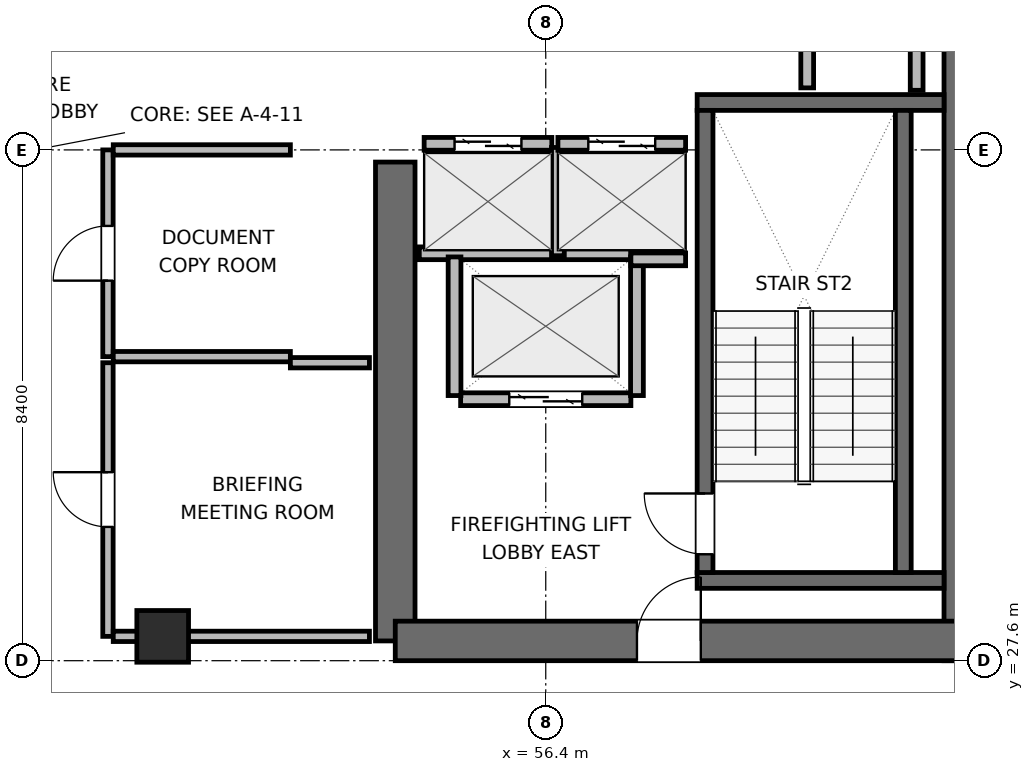
"""IFC4 building model, lengths in metres.
Left out: names, types, materials, properties, quantities, classifications, styles, units other than length and angle.
Written with IfcOpenShell. Run it as: python <this file> out.ifc"""

import sys

from ifc_helpers import new_model, si_unit, direction, frame, frame_2d, origin, origin_2d, place, context, subcontext, project, spatial, rectangle, extrude, element, fill, save


model = new_model("IFC4")
c1 = context("Model", 3, precision=1e-05, world=origin(), true_north=direction((0.0, 1.0)))
c2 = subcontext(c1, "Body", "Model", "MODEL_VIEW")
j1 = project(units=[si_unit("LENGTHUNIT", "METRE"), si_unit("PLANEANGLEUNIT", "RADIAN")], contexts=[c1])
p1 = place(None, origin())
s1 = spatial("IfcSite", under=j1, at=p1, CompositionType="ELEMENT")
p2 = place(p1, origin())
s2 = spatial("IfcBuilding", under=s1, at=p2, CompositionType="ELEMENT")
p3 = place(p2, frame((0.0, 0.0, 247.2)))
s3 = spatial("IfcBuildingStorey", under=s2, at=p3, CompositionType="ELEMENT", Elevation=247.2)
p4 = place(p3, frame((53.925, 27.925, 0.0), z_axis=(0.0, 0.0, 1.0), x_axis=(0.0, 1.0, 0.0)))
e1 = element("IfcWall", 1, at=p4, inside=s3, PredefinedType="SHEAR", context=c2, shape_type="SweptSolid", body=[
    extrude(rectangle(XDim=7.875, YDim=0.65, at=frame_2d((3.938, 0.0))), origin(), (0.0, 0.0, 1.0), 3.9),
])
p5 = place(p3, frame((63.275, 27.6, 0.0), z_axis=(0.0, 0.0, 1.0), x_axis=(0.0, 1.0, 0.0)))
e2 = element("IfcWall", 2, at=p5, inside=s3, PredefinedType="SHEAR", context=c2, shape_type="SweptSolid", body=[
    extrude(rectangle(XDim=16.8, YDim=0.65, at=frame_2d((8.4, 0.0))), origin(), (0.0, 0.0, 1.0), 3.9),
])
p6 = place(p3, frame((53.925, 27.925, 0.0), z_axis=(0.0, 0.0, 1.0), x_axis=(1.0, 0.0, 0.0)))
e3 = element("IfcWall", 3, at=p6, inside=s3, PredefinedType="SHEAR", context=c2, shape_type="SweptSolid", body=[
    extrude(rectangle(XDim=9.35, YDim=0.65, at=frame_2d((4.675, 0.0))), origin(), (0.0, 0.0, 1.0), 3.9),
])
p7 = place(p6, frame((3.975, 0.0, 0.0)))
e4 = element("IfcOpeningElement", 4, at=p7, cuts=e3, PredefinedType="OPENING", context=c2, shape_type="SweptSolid", body=[
    extrude(rectangle(XDim=1.05, YDim=2.04, at=frame_2d((0.525, 1.02))), frame((0.0, 0.335, 0.0), z_axis=(0.0, -1.0, 0.0), x_axis=(1.0, 0.0, 0.0)), (0.0, 0.0, 1.0), 0.67),
])
for number, where, z_axis, x_axis in (
    (5, (58.89, 28.92, 0.0), (0.0, 0.0, 1.0), (1.0, 0.0, 0.0)),
    (6, (58.89, 36.78, 0.0), (0.0, 0.0, 1.0), (1.0, 0.0, 0.0)),
):
    element("IfcWall", number, at=place(p3, frame(where, z_axis=z_axis, x_axis=x_axis)), inside=s3, PredefinedType="SHEAR", context=c2, shape_type="SweptSolid", body=[
        extrude(rectangle(XDim=4.06, YDim=0.26, at=frame_2d((2.03, 0.0))), origin(), (0.0, 0.0, 1.0), 3.9),
    ])
p8 = place(p3, frame((59.02, 29.05, 0.0), z_axis=(0.0, 0.0, 1.0), x_axis=(0.0, 1.0, 0.0)))
e7 = element("IfcWall", 7, at=p8, inside=s3, PredefinedType="SHEAR", context=c2, shape_type="SweptSolid", body=[
    extrude(rectangle(XDim=7.6, YDim=0.26, at=frame_2d((3.8, 0.0))), origin(), (0.0, 0.0, 1.0), 3.9),
])
p9 = place(p8, frame((0.3, 0.0, 0.0)))
e8 = element("IfcOpeningElement", 8, at=p9, cuts=e7, PredefinedType="OPENING", context=c2, shape_type="SweptSolid", body=[
    extrude(rectangle(XDim=1.0, YDim=2.04, at=frame_2d((0.5, 1.02))), frame((0.0, 0.14, 0.0), z_axis=(0.0, -1.0, 0.0), x_axis=(1.0, 0.0, 0.0)), (0.0, 0.0, 1.0), 0.28),
])
p10 = place(p3, frame((62.28, 29.05, 0.0), z_axis=(0.0, 0.0, 1.0), x_axis=(0.0, 1.0, 0.0)))
e9 = element("IfcWall", 9, at=p10, inside=s3, PredefinedType="SHEAR", context=c2, shape_type="SweptSolid", body=[
    extrude(rectangle(XDim=7.6, YDim=0.26, at=frame_2d((3.8, 0.0))), origin(), (0.0, 0.0, 1.0), 3.9),
])
p11 = place(p3, frame((50.1, 28.0, 0.0), z_axis=(0.0, 0.0, 1.0), x_axis=(1.0, 0.0, 0.0)))
e10 = element("IfcColumn", 10, at=p11, inside=s3, PredefinedType="COLUMN", context=c2, shape_type="SweptSolid", body=[
    extrude(rectangle(XDim=0.85, YDim=0.85, at=origin_2d()), origin(), (0.0, 0.0, 1.0), 3.9),
])
p12 = place(p3, frame((60.7, 37.02, 0.0), z_axis=(0.0, 0.0, 1.0), x_axis=(0.0, 1.0, 0.0)))
e11 = element("IfcWall", 11, at=p12, inside=s3, PredefinedType="PARTITIONING", context=c2, shape_type="SweptSolid", body=[
    extrude(rectangle(XDim=1.96, YDim=0.21, at=frame_2d((0.98, 0.0))), origin(), (0.0, 0.0, 1.0), 3.68),
])
p13 = place(p3, frame((62.5, 36.98, 0.0), z_axis=(0.0, 0.0, 1.0), x_axis=(0.0, 1.0, 0.0)))
e12 = element("IfcWall", 12, at=p13, inside=s3, PredefinedType="PARTITIONING", context=c2, shape_type="SweptSolid", body=[
    extrude(rectangle(XDim=2.04, YDim=0.21, at=frame_2d((1.02, 0.0))), origin(), (0.0, 0.0, 1.0), 3.68),
])
p14 = place(p3, frame((55.0, 31.9, 0.0), z_axis=(0.0, 0.0, 1.0), x_axis=(1.0, 0.0, 0.0)))
e13 = element("IfcWall", 13, at=p14, inside=s3, PredefinedType="PARTITIONING", context=c2, shape_type="SweptSolid", body=[
    extrude(rectangle(XDim=2.8, YDim=0.21, at=frame_2d((1.4, 0.0))), origin(), (0.0, 0.0, 1.0), 3.68),
])
p15 = place(p14, frame((0.8, 0.0, 0.0)))
e14 = element("IfcOpeningElement", 14, at=p15, cuts=e13, PredefinedType="OPENING", context=c2, shape_type="SweptSolid", body=[
    extrude(rectangle(XDim=1.2, YDim=2.04, at=frame_2d((0.6, 1.02))), frame((0.0, 0.115, 0.0), z_axis=(0.0, -1.0, 0.0), x_axis=(1.0, 0.0, 0.0)), (0.0, 0.0, 1.0), 0.23),
])
p16 = place(p3, frame((54.32, 34.3, 0.0), z_axis=(0.0, 0.0, 1.0), x_axis=(1.0, 0.0, 0.0)))
e15 = element("IfcWall", 15, at=p16, inside=s3, PredefinedType="PARTITIONING", context=c2, shape_type="SweptSolid", body=[
    extrude(rectangle(XDim=3.48, YDim=0.21, at=frame_2d((1.74, 0.0))), origin(), (0.0, 0.0, 1.0), 3.68),
])
for number, where, z_axis, x_axis in (
    (16, (54.9, 31.96, 0.0), (0.0, 0.0, 1.0), (0.0, 1.0, 0.0)),
    (17, (57.9, 31.96, 0.0), (0.0, 0.0, 1.0), (0.0, 1.0, 0.0)),
):
    element("IfcWall", number, at=place(p3, frame(where, z_axis=z_axis, x_axis=x_axis)), inside=s3, PredefinedType="PARTITIONING", context=c2, shape_type="SweptSolid", body=[
        extrude(rectangle(XDim=2.28, YDim=0.21, at=frame_2d((1.14, 0.0))), origin(), (0.0, 0.0, 1.0), 3.68),
    ])
p17 = place(p3, frame((54.4, 36.1, 0.0), z_axis=(0.0, 0.0, 1.0), x_axis=(1.0, 0.0, 0.0)))
e18 = element("IfcWall", 18, at=p17, inside=s3, PredefinedType="PARTITIONING", context=c2, shape_type="SweptSolid", body=[
    extrude(rectangle(XDim=2.1, YDim=0.21, at=frame_2d((1.05, 0.0))), origin(), (0.0, 0.0, 1.0), 3.68),
])
p18 = place(p17, frame((0.5, 0.0, 0.0)))
e19 = element("IfcOpeningElement", 19, at=p18, cuts=e18, PredefinedType="OPENING", context=c2, shape_type="SweptSolid", body=[
    extrude(rectangle(XDim=1.1, YDim=2.04, at=frame_2d((0.55, 1.02))), frame((0.0, 0.115, 0.0), z_axis=(0.0, -1.0, 0.0), x_axis=(1.0, 0.0, 0.0)), (0.0, 0.0, 1.0), 0.23),
])
p19 = place(p3, frame((56.6, 34.26, 0.0), z_axis=(0.0, 0.0, 1.0), x_axis=(0.0, 1.0, 0.0)))
e20 = element("IfcWall", 20, at=p19, inside=s3, PredefinedType="PARTITIONING", context=c2, shape_type="SweptSolid", body=[
    extrude(rectangle(XDim=1.78, YDim=0.21, at=frame_2d((0.89, 0.0))), origin(), (0.0, 0.0, 1.0), 3.68),
])
p20 = place(p3, frame((56.6, 36.1, 0.0), z_axis=(0.0, 0.0, 1.0), x_axis=(1.0, 0.0, 0.0)))
e21 = element("IfcWall", 21, at=p20, inside=s3, PredefinedType="PARTITIONING", context=c2, shape_type="SweptSolid", body=[
    extrude(rectangle(XDim=2.1, YDim=0.21, at=frame_2d((1.05, 0.0))), origin(), (0.0, 0.0, 1.0), 3.68),
])
p21 = place(p20, frame((0.5, 0.0, 0.0)))
e22 = element("IfcOpeningElement", 22, at=p21, cuts=e21, PredefinedType="OPENING", context=c2, shape_type="SweptSolid", body=[
    extrude(rectangle(XDim=1.1, YDim=2.04, at=frame_2d((0.55, 1.02))), frame((0.0, 0.115, 0.0), z_axis=(0.0, -1.0, 0.0), x_axis=(1.0, 0.0, 0.0)), (0.0, 0.0, 1.0), 0.23),
])
p22 = place(p3, frame((57.8, 34.2, 0.0), z_axis=(0.0, 0.0, 1.0), x_axis=(1.0, 0.0, 0.0)))
e23 = element("IfcWall", 23, at=p22, inside=s3, PredefinedType="PARTITIONING", context=c2, shape_type="SweptSolid", body=[
    extrude(rectangle(XDim=0.9, YDim=0.21, at=frame_2d((0.45, 0.0))), origin(), (0.0, 0.0, 1.0), 3.68),
])
p23 = place(p3, frame((49.2, 32.6, 0.0), z_axis=(0.0, 0.0, 1.0), x_axis=(0.0, 1.0, 0.0)))
e24 = element("IfcWall", 24, at=p23, inside=s3, PredefinedType="PARTITIONING", context=c2, shape_type="SweptSolid", body=[
    extrude(rectangle(XDim=3.4, YDim=0.17, at=frame_2d((1.7, 0.0))), origin(), (0.0, 0.0, 1.0), 3.68),
])
p24 = place(p23, frame((1.25, 0.0, 0.0)))
e25 = element("IfcOpeningElement", 25, at=p24, cuts=e24, PredefinedType="OPENING", context=c2, shape_type="SweptSolid", body=[
    extrude(rectangle(XDim=0.9, YDim=2.02, at=frame_2d((0.45, 1.01))), frame((0.0, 0.095, 0.0), z_axis=(0.0, -1.0, 0.0), x_axis=(1.0, 0.0, 0.0)), (0.0, 0.0, 1.0), 0.19),
])
for number, where, z_axis, x_axis in (
    (26, (49.287, 32.6, 0.0), (0.0, 0.0, 1.0), (1.0, 0.0, 0.0)),
    (27, (49.287, 36.0, 0.0), (0.0, 0.0, 1.0), (1.0, 0.0, 0.0)),
):
    element("IfcWall", number, at=place(p3, frame(where, z_axis=z_axis, x_axis=x_axis)), inside=s3, PredefinedType="PARTITIONING", context=c2, shape_type="SweptSolid", body=[
        extrude(rectangle(XDim=2.913, YDim=0.17, at=frame_2d((1.457, 0.0))), origin(), (0.0, 0.0, 1.0), 3.68),
    ])
p25 = place(p3, frame((49.2, 28.0, 0.0), z_axis=(0.0, 0.0, 1.0), x_axis=(0.0, 1.0, 0.0)))
e28 = element("IfcWall", 28, at=p25, inside=s3, PredefinedType="PARTITIONING", context=c2, shape_type="SweptSolid", body=[
    extrude(rectangle(XDim=4.5, YDim=0.17, at=frame_2d((2.25, 0.0))), origin(), (0.0, 0.0, 1.0), 3.68),
])
p26 = place(p25, frame((1.8, 0.0, 0.0)))
e29 = element("IfcOpeningElement", 29, at=p26, cuts=e28, PredefinedType="OPENING", context=c2, shape_type="SweptSolid", body=[
    extrude(rectangle(XDim=0.9, YDim=2.02, at=frame_2d((0.45, 1.01))), frame((0.0, 0.095, 0.0), z_axis=(0.0, -1.0, 0.0), x_axis=(1.0, 0.0, 0.0)), (0.0, 0.0, 1.0), 0.19),
])
p27 = place(p3, frame((49.287, 28.0, 0.0), z_axis=(0.0, 0.0, 1.0), x_axis=(1.0, 0.0, 0.0)))
e30 = element("IfcWall", 30, at=p27, inside=s3, PredefinedType="PARTITIONING", context=c2, shape_type="SweptSolid", body=[
    extrude(rectangle(XDim=4.213, YDim=0.17, at=frame_2d((2.106, 0.0))), origin(), (0.0, 0.0, 1.0), 2.765),
])
p28 = place(p3, frame((52.2, 32.5, 0.0), z_axis=(0.0, 0.0, 1.0), x_axis=(1.0, 0.0, 0.0)))
e31 = element("IfcWall", 31, at=p28, inside=s3, PredefinedType="PARTITIONING", context=c2, shape_type="SweptSolid", body=[
    extrude(rectangle(XDim=1.3, YDim=0.17, at=frame_2d((0.65, 0.0))), origin(), (0.0, 0.0, 1.0), 3.68),
])
p29 = place(p9, origin())
e32 = element("IfcDoor", 32, at=p29, inside=s3, OperationType="SINGLE_SWING_RIGHT", PredefinedType="DOOR", context=c2, shape_type="SweptSolid", body=[
    extrude(rectangle(XDim=1.0, YDim=2.04, at=frame_2d((0.5, 1.02))), frame((0.0, 0.025, 0.0), z_axis=(0.0, -1.0, 0.0), x_axis=(1.0, 0.0, 0.0)), (0.0, 0.0, 1.0), 0.05),
])
fill(e8, e32)
p30 = place(p15, origin())
e33 = element("IfcDoor", 33, at=p30, inside=s3, OperationType="DOUBLE_DOOR_SLIDING", PredefinedType="DOOR", context=c2, shape_type="SweptSolid", body=[
    extrude(rectangle(XDim=1.2, YDim=2.04, at=frame_2d((0.6, 1.02))), frame((0.0, 0.025, 0.0), z_axis=(0.0, -1.0, 0.0), x_axis=(1.0, 0.0, 0.0)), (0.0, 0.0, 1.0), 0.05),
])
fill(e14, e33)
p31 = place(p18, origin())
e34 = element("IfcDoor", 34, at=p31, inside=s3, OperationType="DOUBLE_DOOR_SLIDING", PredefinedType="DOOR", context=c2, shape_type="SweptSolid", body=[
    extrude(rectangle(XDim=1.1, YDim=2.04, at=frame_2d((0.55, 1.02))), frame((0.0, 0.025, 0.0), z_axis=(0.0, -1.0, 0.0), x_axis=(1.0, 0.0, 0.0)), (0.0, 0.0, 1.0), 0.05),
])
fill(e19, e34)
p32 = place(p21, origin())
e35 = element("IfcDoor", 35, at=p32, inside=s3, OperationType="DOUBLE_DOOR_SLIDING", PredefinedType="DOOR", context=c2, shape_type="SweptSolid", body=[
    extrude(rectangle(XDim=1.1, YDim=2.04, at=frame_2d((0.55, 1.02))), frame((0.0, 0.025, 0.0), z_axis=(0.0, -1.0, 0.0), x_axis=(1.0, 0.0, 0.0)), (0.0, 0.0, 1.0), 0.05),
])
fill(e22, e35)
p33 = place(p7, origin())
e36 = element("IfcDoor", 36, at=p33, inside=s3, OperationType="SINGLE_SWING_RIGHT", PredefinedType="DOOR", context=c2, shape_type="SweptSolid", body=[
    extrude(rectangle(XDim=1.05, YDim=2.04, at=frame_2d((0.525, 1.02))), frame((0.0, 0.025, 0.0), z_axis=(0.0, -1.0, 0.0), x_axis=(1.0, 0.0, 0.0)), (0.0, 0.0, 1.0), 0.05),
])
fill(e4, e36)
p34 = place(p24, origin())
e37 = element("IfcDoor", 37, at=p34, inside=s3, OperationType="SINGLE_SWING_LEFT", PredefinedType="DOOR", context=c2, shape_type="SweptSolid", body=[
    extrude(rectangle(XDim=0.9, YDim=2.02, at=frame_2d((0.45, 1.01))), frame((0.0, 0.025, 0.0), z_axis=(0.0, -1.0, 0.0), x_axis=(1.0, 0.0, 0.0)), (0.0, 0.0, 1.0), 0.05),
])
fill(e25, e37)
p35 = place(p26, origin())
e38 = element("IfcDoor", 38, at=p35, inside=s3, OperationType="SINGLE_SWING_RIGHT", PredefinedType="DOOR", context=c2, shape_type="SweptSolid", body=[
    extrude(rectangle(XDim=0.9, YDim=2.02, at=frame_2d((0.45, 1.01))), frame((0.0, 0.025, 0.0), z_axis=(0.0, -1.0, 0.0), x_axis=(1.0, 0.0, 0.0)), (0.0, 0.0, 1.0), 0.05),
])
fill(e29, e38)
save(model, sys.argv[1])
